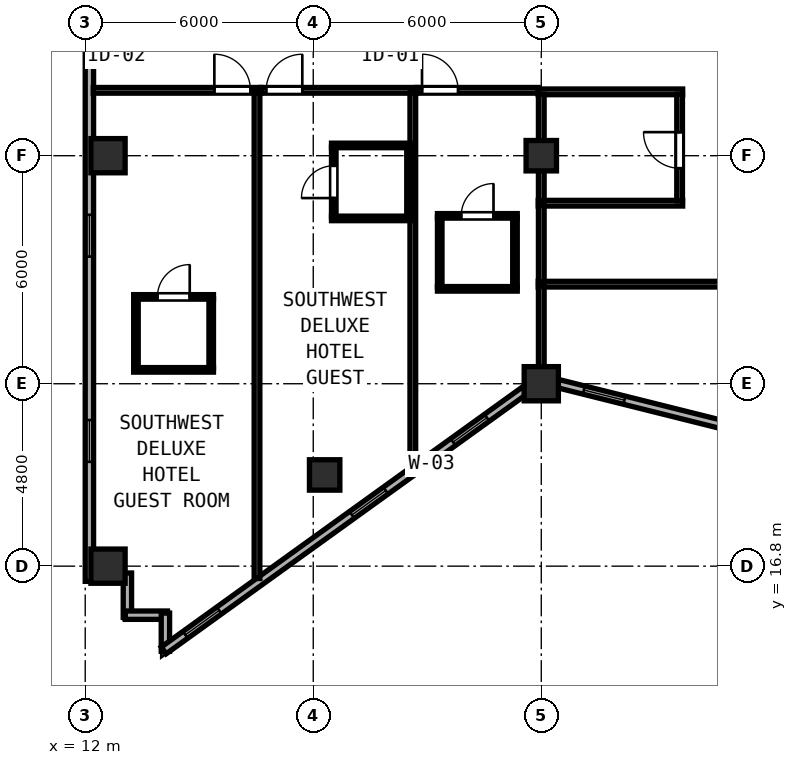
"""IFC4 building model, lengths in metres.
Left out: names, types, materials, properties, quantities, classifications, styles, units other than length and angle.
Written with IfcOpenShell. Run it as: python <this file> out.ifc"""

import sys

from ifc_helpers import new_model, si_unit, direction, frame, frame_2d, origin, origin_2d, place, context, subcontext, project, spatial, rectangle, hollow_rectangle, extrude, element, fill, save


model = new_model("IFC4")
c1 = context("Model", 3, precision=1e-05, world=origin(), true_north=direction((0.0, 1.0)))
c2 = subcontext(c1, "Body", "Model", "MODEL_VIEW")
j1 = project(units=[si_unit("LENGTHUNIT", "METRE"), si_unit("PLANEANGLEUNIT", "RADIAN")], contexts=[c1])
p1 = place(None, origin())
s1 = spatial("IfcSite", under=j1, at=p1, CompositionType="ELEMENT")
p2 = place(p1, origin())
s2 = spatial("IfcBuilding", under=s1, at=p2, CompositionType="ELEMENT")
p3 = place(p2, frame((0.0, 0.0, 199.4)))
s3 = spatial("IfcBuildingStorey", under=s2, at=p3, CompositionType="ELEMENT", Elevation=199.4)
for number, where, z_axis, x_axis in (
    (1, (24.0, 21.6, 0.0), (0.0, 0.0, 1.0), (1.0, 0.0, 0.0)),
    (2, (12.6, 16.8, 0.0), (0.0, 0.0, 1.0), (1.0, 0.0, 0.0)),
    (3, (12.6, 27.6, 0.0), (0.0, 0.0, 1.0), (1.0, 0.0, 0.0)),
):
    element("IfcColumn", number, at=place(p3, frame(where, z_axis=z_axis, x_axis=x_axis)), inside=s3, PredefinedType="COLUMN", context=c2, shape_type="SweptSolid", body=[
        extrude(hollow_rectangle(XDim=0.9, YDim=0.9, WallThickness=0.034, at=origin_2d()), origin(), (0.0, 0.0, 1.0), 3.8),
    ])
for number, where, z_axis, x_axis in (
    (4, (24.0, 27.6, 0.0), (0.0, 0.0, 1.0), (1.0, 0.0, 0.0)),
    (5, (18.3, 19.2, 0.0), (0.0, 0.0, 1.0), (1.0, 0.0, 0.0)),
):
    element("IfcColumn", number, at=place(p3, frame(where, z_axis=z_axis, x_axis=x_axis)), inside=s3, PredefinedType="COLUMN", context=c2, shape_type="SweptSolid", body=[
        extrude(hollow_rectangle(XDim=0.8, YDim=0.8, WallThickness=0.03, at=origin_2d()), origin(), (0.0, 0.0, 1.0), 3.8),
    ])
p4 = place(p3, frame((12.11, 37.545, 0.0), z_axis=(0.0, 0.0, 1.0), x_axis=(0.0, -1.0, 0.0)))
e6 = element("IfcWall", 6, at=p4, inside=s3, PredefinedType="SOLIDWALL", context=c2, shape_type="SweptSolid", body=[
    extrude(rectangle(XDim=21.145, YDim=0.22, at=frame_2d((10.573, 0.0))), origin(), (0.0, 0.0, 1.0), 3.62),
])
p5 = place(p4, frame((0.7, 0.0, 0.85)))
e7 = element("IfcOpeningElement", 7, at=p5, cuts=e6, PredefinedType="OPENING", context=c2, shape_type="SweptSolid", body=[
    extrude(rectangle(XDim=1.1, YDim=1.75, at=frame_2d((0.55, 0.875))), frame((0.0, 0.12, 0.0), z_axis=(0.0, -1.0, 0.0), x_axis=(1.0, 0.0, 0.0)), (0.0, 0.0, 1.0), 0.24),
])
p6 = place(p4, frame((6.45, 0.0, 0.85)))
e8 = element("IfcOpeningElement", 8, at=p6, cuts=e6, PredefinedType="OPENING", context=c2, shape_type="SweptSolid", body=[
    extrude(rectangle(XDim=1.1, YDim=1.75, at=frame_2d((0.55, 0.875))), frame((0.0, 0.12, 0.0), z_axis=(0.0, -1.0, 0.0), x_axis=(1.0, 0.0, 0.0)), (0.0, 0.0, 1.0), 0.24),
])
p7 = place(p4, frame((11.5, 0.0, 0.85)))
e9 = element("IfcOpeningElement", 9, at=p7, cuts=e6, PredefinedType="OPENING", context=c2, shape_type="SweptSolid", body=[
    extrude(rectangle(XDim=1.1, YDim=1.75, at=frame_2d((0.55, 0.875))), frame((0.0, 0.12, 0.0), z_axis=(0.0, -1.0, 0.0), x_axis=(1.0, 0.0, 0.0)), (0.0, 0.0, 1.0), 0.24),
])
p8 = place(p4, frame((16.9, 0.0, 0.85)))
e10 = element("IfcOpeningElement", 10, at=p8, cuts=e6, PredefinedType="OPENING", context=c2, shape_type="SweptSolid", body=[
    extrude(rectangle(XDim=1.1, YDim=1.75, at=frame_2d((0.55, 0.875))), frame((0.0, 0.12, 0.0), z_axis=(0.0, -1.0, 0.0), x_axis=(1.0, 0.0, 0.0)), (0.0, 0.0, 1.0), 0.24),
])
p9 = place(p3, frame((13.11, 16.62, 0.0), z_axis=(0.0, 0.0, 1.0), x_axis=(0.0, -1.0, 0.0)))
e11 = element("IfcWall", 11, at=p9, inside=s3, PredefinedType="SOLIDWALL", context=c2, shape_type="SweptSolid", body=[
    extrude(rectangle(XDim=1.165, YDim=0.22, at=frame_2d((0.583, 0.0))), origin(), (0.0, 0.0, 1.0), 3.62),
])
p10 = place(p3, frame((13.055, 15.51, 0.0), z_axis=(0.0, 0.0, 1.0), x_axis=(1.0, 0.0, 0.0)))
e12 = element("IfcWall", 12, at=p10, inside=s3, PredefinedType="SOLIDWALL", context=c2, shape_type="SweptSolid", body=[
    extrude(rectangle(XDim=1.11, YDim=0.22, at=frame_2d((0.555, 0.0))), origin(), (0.0, 0.0, 1.0), 3.62),
])
p11 = place(p3, frame((14.11, 15.565, 0.0), z_axis=(0.0, 0.0, 1.0), x_axis=(0.0, -1.0, 0.0)))
e13 = element("IfcWall", 13, at=p11, inside=s3, PredefinedType="SOLIDWALL", context=c2, shape_type="SweptSolid", body=[
    extrude(rectangle(XDim=1.005, YDim=0.22, at=frame_2d((0.502, 0.0))), origin(), (0.0, 0.0, 1.0), 3.62),
])
p12 = place(p3, frame((14.065, 14.583, 0.0), z_axis=(0.0, 0.0, 1.0), x_axis=(0.811534737332, 0.58430417601, 0.0)))
e14 = element("IfcWall", 14, at=p12, inside=s3, PredefinedType="SOLIDWALL", context=c2, shape_type="SweptSolid", body=[
    extrude(rectangle(XDim=11.697, YDim=0.22, at=frame_2d((5.849, 0.0))), origin(), (0.0, 0.0, 1.0), 3.215),
])
p13 = place(p12, frame((0.7, 0.0, 0.85)))
e15 = element("IfcOpeningElement", 15, at=p13, cuts=e14, PredefinedType="OPENING", context=c2, shape_type="SweptSolid", body=[
    extrude(rectangle(XDim=1.1, YDim=1.75, at=frame_2d((0.55, 0.875))), frame((0.0, 0.12, 0.0), z_axis=(0.0, -1.0, 0.0), x_axis=(1.0, 0.0, 0.0)), (0.0, 0.0, 1.0), 0.24),
])
p14 = place(p12, frame((6.1, 0.0, 0.85)))
e16 = element("IfcOpeningElement", 16, at=p14, cuts=e14, PredefinedType="OPENING", context=c2, shape_type="SweptSolid", body=[
    extrude(rectangle(XDim=1.1, YDim=1.75, at=frame_2d((0.55, 0.875))), frame((0.0, 0.12, 0.0), z_axis=(0.0, -1.0, 0.0), x_axis=(1.0, 0.0, 0.0)), (0.0, 0.0, 1.0), 0.24),
])
p15 = place(p12, frame((9.38, 0.0, 0.85)))
e17 = element("IfcOpeningElement", 17, at=p15, cuts=e14, PredefinedType="OPENING", context=c2, shape_type="SweptSolid", body=[
    extrude(rectangle(XDim=1.1, YDim=1.75, at=frame_2d((0.55, 0.875))), frame((0.0, 0.12, 0.0), z_axis=(0.0, -1.0, 0.0), x_axis=(1.0, 0.0, 0.0)), (0.0, 0.0, 1.0), 0.24),
])
p16 = place(p3, frame((24.442, 21.603, 0.0), z_axis=(0.0, 0.0, 1.0), x_axis=(0.970145648609, -0.242523030833, 0.0)))
e18 = element("IfcWall", 18, at=p16, inside=s3, PredefinedType="SOLIDWALL", context=c2, shape_type="SweptSolid", body=[
    extrude(rectangle(XDim=4.561, YDim=0.22, at=frame_2d((2.281, 0.0))), origin(), (0.0, 0.0, 1.0), 3.215),
])
p17 = place(p16, frame((0.7, 0.0, 0.85)))
e19 = element("IfcOpeningElement", 19, at=p17, cuts=e18, PredefinedType="OPENING", context=c2, shape_type="SweptSolid", body=[
    extrude(rectangle(XDim=1.1, YDim=1.75, at=frame_2d((0.55, 0.875))), frame((0.0, 0.12, 0.0), z_axis=(0.0, -1.0, 0.0), x_axis=(1.0, 0.0, 0.0)), (0.0, 0.0, 1.0), 0.24),
])
for number, where, z_axis, x_axis in (
    (20, (23.92, 29.28, 0.0), (0.0, 0.0, 1.0), (1.0, 0.0, 0.0)),
    (21, (23.92, 26.35, 0.0), (0.0, 0.0, 1.0), (1.0, 0.0, 0.0)),
):
    element("IfcWall", number, at=place(p3, frame(where, z_axis=z_axis, x_axis=x_axis)), inside=s3, PredefinedType="PARTITIONING", context=c2, shape_type="SweptSolid", body=[
        extrude(rectangle(XDim=3.8, YDim=0.15, at=frame_2d((1.9, 0.0))), origin(), (0.0, 0.0, 1.0), 3.62),
    ])
p18 = place(p3, frame((24.0, 26.41, 0.0), z_axis=(0.0, 0.0, 1.0), x_axis=(0.0, 1.0, 0.0)))
e22 = element("IfcWall", 22, at=p18, inside=s3, PredefinedType="PARTITIONING", context=c2, shape_type="SweptSolid", body=[
    extrude(rectangle(XDim=2.81, YDim=0.15, at=frame_2d((1.405, 0.0))), origin(), (0.0, 0.0, 1.0), 3.215),
])
p19 = place(p3, frame((27.64, 26.41, 0.0), z_axis=(0.0, 0.0, 1.0), x_axis=(0.0, 1.0, 0.0)))
e23 = element("IfcWall", 23, at=p19, inside=s3, PredefinedType="PARTITIONING", context=c2, shape_type="SweptSolid", body=[
    extrude(rectangle(XDim=2.81, YDim=0.15, at=frame_2d((1.405, 0.0))), origin(), (0.0, 0.0, 1.0), 3.62),
])
p20 = place(p19, frame((1.81, 0.0, 0.0), z_axis=(0.0, 0.0, 1.0), x_axis=(-1.0, 0.0, 0.0)))
e24 = element("IfcOpeningElement", 24, at=p20, cuts=e23, PredefinedType="OPENING", context=c2, shape_type="SweptSolid", body=[
    extrude(rectangle(XDim=0.95, YDim=2.12, at=frame_2d((0.475, 1.06))), frame((0.0, 0.085, 0.0), z_axis=(0.0, -1.0, 0.0), x_axis=(1.0, 0.0, 0.0)), (0.0, 0.0, 1.0), 0.17),
])
p21 = place(p3, frame((23.92, 24.22, 0.0), z_axis=(0.0, 0.0, 1.0), x_axis=(1.0, 0.0, 0.0)))
e25 = element("IfcWall", 25, at=p21, inside=s3, PredefinedType="PARTITIONING", context=c2, shape_type="SweptSolid", body=[
    extrude(rectangle(XDim=14.56, YDim=0.15, at=frame_2d((7.28, 0.0))), origin(), (0.0, 0.0, 1.0), 3.62),
])
p22 = place(p21, frame((9.445, 0.0, 0.0), z_axis=(0.0, 0.0, 1.0), x_axis=(-1.0, 0.0, 0.0)))
e26 = element("IfcOpeningElement", 26, at=p22, cuts=e25, PredefinedType="OPENING", context=c2, shape_type="SweptSolid", body=[
    extrude(rectangle(XDim=0.95, YDim=2.12, at=frame_2d((0.475, 1.06))), frame((0.0, 0.085, 0.0), z_axis=(0.0, -1.0, 0.0), x_axis=(1.0, 0.0, 0.0)), (0.0, 0.0, 1.0), 0.17),
])
p23 = place(p3, frame((24.0, 21.819, 0.0), z_axis=(0.0, 0.0, 1.0), x_axis=(0.0, 1.0, 0.0)))
e27 = element("IfcWall", 27, at=p23, inside=s3, PredefinedType="PARTITIONING", context=c2, shape_type="SweptSolid", body=[
    extrude(rectangle(XDim=2.341, YDim=0.15, at=frame_2d((1.171, 0.0))), origin(), (0.0, 0.0, 1.0), 3.215),
])
p24 = place(p3, frame((12.212, 29.32, 0.0), z_axis=(0.0, 0.0, 1.0), x_axis=(1.0, 0.0, 0.0)))
e28 = element("IfcWall", 28, at=p24, inside=s3, PredefinedType="PARTITIONING", context=c2, shape_type="SweptSolid", body=[
    extrude(rectangle(XDim=4.408, YDim=0.15, at=frame_2d((2.204, 0.0))), origin(), (0.0, 0.0, 1.0), 3.62),
])
p25 = place(p24, frame((4.136, 0.0, 0.0), z_axis=(0.0, 0.0, 1.0), x_axis=(-1.0, 0.0, 0.0)))
e29 = element("IfcOpeningElement", 29, at=p25, cuts=e28, PredefinedType="OPENING", context=c2, shape_type="SweptSolid", body=[
    extrude(rectangle(XDim=0.95, YDim=2.15, at=frame_2d((0.475, 1.075))), frame((0.0, 0.085, 0.0), z_axis=(0.0, -1.0, 0.0), x_axis=(1.0, 0.0, 0.0)), (0.0, 0.0, 1.0), 0.17),
])
p26 = place(p3, frame((16.52, 16.476, 0.0), z_axis=(0.0, 0.0, 1.0), x_axis=(0.0, 1.0, 0.0)))
e30 = element("IfcWall", 30, at=p26, inside=s3, PredefinedType="PARTITIONING", context=c2, shape_type="SweptSolid", body=[
    extrude(rectangle(XDim=12.784, YDim=0.15, at=frame_2d((6.392, 0.0))), origin(), (0.0, 0.0, 1.0), 3.62),
])
p27 = place(p3, frame((13.275, 23.885, 0.0), z_axis=(0.0, 0.0, 1.0), x_axis=(1.0, 0.0, 0.0)))
e31 = element("IfcWall", 31, at=p27, inside=s3, PredefinedType="PARTITIONING", context=c2, shape_type="SweptSolid", body=[
    extrude(rectangle(XDim=2.1, YDim=0.12, at=frame_2d((1.05, 0.0))), origin(), (0.0, 0.0, 1.0), 3.62),
])
p28 = place(p27, frame((1.475, 0.0, 0.0), z_axis=(0.0, 0.0, 1.0), x_axis=(-1.0, 0.0, 0.0)))
e32 = element("IfcOpeningElement", 32, at=p28, cuts=e31, PredefinedType="OPENING", context=c2, shape_type="SweptSolid", body=[
    extrude(rectangle(XDim=0.85, YDim=2.1, at=frame_2d((0.425, 1.05))), frame((0.0, 0.07, 0.0), z_axis=(0.0, -1.0, 0.0), x_axis=(1.0, 0.0, 0.0)), (0.0, 0.0, 1.0), 0.14),
])
p29 = place(p3, frame((13.275, 21.965, 0.0), z_axis=(0.0, 0.0, 1.0), x_axis=(1.0, 0.0, 0.0)))
e33 = element("IfcWall", 33, at=p29, inside=s3, PredefinedType="PARTITIONING", context=c2, shape_type="SweptSolid", body=[
    extrude(rectangle(XDim=2.1, YDim=0.12, at=frame_2d((1.05, 0.0))), origin(), (0.0, 0.0, 1.0), 3.62),
])
for number, where, z_axis, x_axis in (
    (34, (13.335, 22.01, 0.0), (0.0, 0.0, 1.0), (0.0, 1.0, 0.0)),
    (35, (15.315, 22.01, 0.0), (0.0, 0.0, 1.0), (0.0, 1.0, 0.0)),
):
    element("IfcWall", number, at=place(p3, frame(where, z_axis=z_axis, x_axis=x_axis)), inside=s3, PredefinedType="PARTITIONING", context=c2, shape_type="SweptSolid", body=[
        extrude(rectangle(XDim=1.83, YDim=0.12, at=frame_2d((0.915, 0.0))), origin(), (0.0, 0.0, 1.0), 3.62),
    ])
p30 = place(p3, frame((16.622, 29.32, 0.0), z_axis=(0.0, 0.0, 1.0), x_axis=(1.0, 0.0, 0.0)))
e36 = element("IfcWall", 36, at=p30, inside=s3, PredefinedType="PARTITIONING", context=c2, shape_type="SweptSolid", body=[
    extrude(rectangle(XDim=4.098, YDim=0.15, at=frame_2d((2.049, 0.0))), origin(), (0.0, 0.0, 1.0), 3.62),
])
p31 = place(p30, frame((1.09, 0.0, 0.0), z_axis=(0.0, 0.0, 1.0), x_axis=(-1.0, 0.0, 0.0)))
e37 = element("IfcOpeningElement", 37, at=p31, cuts=e36, PredefinedType="OPENING", context=c2, shape_type="SweptSolid", body=[
    extrude(rectangle(XDim=0.95, YDim=2.15, at=frame_2d((0.475, 1.075))), frame((0.0, 0.085, 0.0), z_axis=(0.0, -1.0, 0.0), x_axis=(1.0, 0.0, 0.0)), (0.0, 0.0, 1.0), 0.17),
])
p32 = place(p3, frame((20.62, 19.427, 0.0), z_axis=(0.0, 0.0, 1.0), x_axis=(0.0, 1.0, 0.0)))
e38 = element("IfcWall", 38, at=p32, inside=s3, PredefinedType="PARTITIONING", context=c2, shape_type="SweptSolid", body=[
    extrude(rectangle(XDim=9.833, YDim=0.15, at=frame_2d((4.916, 0.0))), origin(), (0.0, 0.0, 1.0), 3.62),
])
for number, where, z_axis, x_axis in (
    (39, (18.48, 27.87, 0.0), (0.0, 0.0, 1.0), (1.0, 0.0, 0.0)),
    (40, (18.48, 25.95, 0.0), (0.0, 0.0, 1.0), (1.0, 0.0, 0.0)),
):
    element("IfcWall", number, at=place(p3, frame(where, z_axis=z_axis, x_axis=x_axis)), inside=s3, PredefinedType="PARTITIONING", context=c2, shape_type="SweptSolid", body=[
        extrude(rectangle(XDim=2.08, YDim=0.12, at=frame_2d((1.04, 0.0))), origin(), (0.0, 0.0, 1.0), 3.62),
    ])
p33 = place(p3, frame((18.54, 25.995, 0.0), z_axis=(0.0, 0.0, 1.0), x_axis=(0.0, 1.0, 0.0)))
e41 = element("IfcWall", 41, at=p33, inside=s3, PredefinedType="PARTITIONING", context=c2, shape_type="SweptSolid", body=[
    extrude(rectangle(XDim=1.83, YDim=0.12, at=frame_2d((0.915, 0.0))), origin(), (0.0, 0.0, 1.0), 3.62),
])
p34 = place(p33, frame((1.34, 0.0, 0.0), z_axis=(0.0, 0.0, 1.0), x_axis=(-1.0, 0.0, 0.0)))
e42 = element("IfcOpeningElement", 42, at=p34, cuts=e41, PredefinedType="OPENING", context=c2, shape_type="SweptSolid", body=[
    extrude(rectangle(XDim=0.85, YDim=2.1, at=frame_2d((0.425, 1.05))), frame((0.0, 0.07, 0.0), z_axis=(0.0, -1.0, 0.0), x_axis=(1.0, 0.0, 0.0)), (0.0, 0.0, 1.0), 0.14),
])
p35 = place(p3, frame((20.52, 25.995, 0.0), z_axis=(0.0, 0.0, 1.0), x_axis=(0.0, 1.0, 0.0)))
e43 = element("IfcWall", 43, at=p35, inside=s3, PredefinedType="PARTITIONING", context=c2, shape_type="SweptSolid", body=[
    extrude(rectangle(XDim=1.83, YDim=0.12, at=frame_2d((0.915, 0.0))), origin(), (0.0, 0.0, 1.0), 3.62),
])
p36 = place(p3, frame((20.722, 29.32, 0.0), z_axis=(0.0, 0.0, 1.0), x_axis=(1.0, 0.0, 0.0)))
e44 = element("IfcWall", 44, at=p36, inside=s3, PredefinedType="PARTITIONING", context=c2, shape_type="SweptSolid", body=[
    extrude(rectangle(XDim=3.196, YDim=0.15, at=frame_2d((1.598, 0.0))), origin(), (0.0, 0.0, 1.0), 3.62),
])
p37 = place(p36, frame((1.09, 0.0, 0.0), z_axis=(0.0, 0.0, 1.0), x_axis=(-1.0, 0.0, 0.0)))
e45 = element("IfcOpeningElement", 45, at=p37, cuts=e44, PredefinedType="OPENING", context=c2, shape_type="SweptSolid", body=[
    extrude(rectangle(XDim=0.95, YDim=2.15, at=frame_2d((0.475, 1.075))), frame((0.0, 0.085, 0.0), z_axis=(0.0, -1.0, 0.0), x_axis=(1.0, 0.0, 0.0)), (0.0, 0.0, 1.0), 0.17),
])
p38 = place(p3, frame((24.0, 24.28, 0.0), z_axis=(0.0, 0.0, 1.0), x_axis=(0.0, 1.0, 0.0)))
e46 = element("IfcWall", 46, at=p38, inside=s3, PredefinedType="PARTITIONING", context=c2, shape_type="SweptSolid", body=[
    extrude(rectangle(XDim=2.01, YDim=0.15, at=frame_2d((1.005, 0.0))), origin(), (0.0, 0.0, 1.0), 3.215),
])
p39 = place(p3, frame((21.268, 26.017, 0.0), z_axis=(0.0, 0.0, 1.0), x_axis=(1.0, 0.0, 0.0)))
e47 = element("IfcWall", 47, at=p39, inside=s3, PredefinedType="PARTITIONING", context=c2, shape_type="SweptSolid", body=[
    extrude(rectangle(XDim=2.1, YDim=0.12, at=frame_2d((1.05, 0.0))), origin(), (0.0, 0.0, 1.0), 3.62),
])
p40 = place(p39, frame((1.475, 0.0, 0.0), z_axis=(0.0, 0.0, 1.0), x_axis=(-1.0, 0.0, 0.0)))
e48 = element("IfcOpeningElement", 48, at=p40, cuts=e47, PredefinedType="OPENING", context=c2, shape_type="SweptSolid", body=[
    extrude(rectangle(XDim=0.85, YDim=2.1, at=frame_2d((0.425, 1.05))), frame((0.0, 0.07, 0.0), z_axis=(0.0, -1.0, 0.0), x_axis=(1.0, 0.0, 0.0)), (0.0, 0.0, 1.0), 0.14),
])
p41 = place(p3, frame((21.268, 24.097, 0.0), z_axis=(0.0, 0.0, 1.0), x_axis=(1.0, 0.0, 0.0)))
e49 = element("IfcWall", 49, at=p41, inside=s3, PredefinedType="PARTITIONING", context=c2, shape_type="SweptSolid", body=[
    extrude(rectangle(XDim=2.1, YDim=0.12, at=frame_2d((1.05, 0.0))), origin(), (0.0, 0.0, 1.0), 3.62),
])
for number, where, z_axis, x_axis in (
    (50, (21.328, 24.142, 0.0), (0.0, 0.0, 1.0), (0.0, 1.0, 0.0)),
    (51, (23.308, 24.142, 0.0), (0.0, 0.0, 1.0), (0.0, 1.0, 0.0)),
):
    element("IfcWall", number, at=place(p3, frame(where, z_axis=z_axis, x_axis=x_axis)), inside=s3, PredefinedType="PARTITIONING", context=c2, shape_type="SweptSolid", body=[
        extrude(rectangle(XDim=1.83, YDim=0.12, at=frame_2d((0.915, 0.0))), origin(), (0.0, 0.0, 1.0), 3.62),
    ])
p42 = place(p6, origin())
e52 = element("IfcWindow", 52, at=p42, inside=s3, PartitioningType="SINGLE_PANEL", PredefinedType="WINDOW", context=c2, shape_type="SweptSolid", body=[
    extrude(rectangle(XDim=1.1, YDim=1.75, at=frame_2d((0.55, 0.875))), frame((0.0, 0.03, 0.0), z_axis=(0.0, -1.0, 0.0), x_axis=(1.0, 0.0, 0.0)), (0.0, 0.0, 1.0), 0.06),
])
fill(e8, e52)
p43 = place(p7, origin())
e53 = element("IfcWindow", 53, at=p43, inside=s3, PartitioningType="SINGLE_PANEL", PredefinedType="WINDOW", context=c2, shape_type="SweptSolid", body=[
    extrude(rectangle(XDim=1.1, YDim=1.75, at=frame_2d((0.55, 0.875))), frame((0.0, 0.03, 0.0), z_axis=(0.0, -1.0, 0.0), x_axis=(1.0, 0.0, 0.0)), (0.0, 0.0, 1.0), 0.06),
])
fill(e9, e53)
p44 = place(p8, origin())
e54 = element("IfcWindow", 54, at=p44, inside=s3, PartitioningType="SINGLE_PANEL", PredefinedType="WINDOW", context=c2, shape_type="SweptSolid", body=[
    extrude(rectangle(XDim=1.1, YDim=1.75, at=frame_2d((0.55, 0.875))), frame((0.0, 0.03, 0.0), z_axis=(0.0, -1.0, 0.0), x_axis=(1.0, 0.0, 0.0)), (0.0, 0.0, 1.0), 0.06),
])
fill(e10, e54)
p45 = place(p13, origin())
e55 = element("IfcWindow", 55, at=p45, inside=s3, PartitioningType="SINGLE_PANEL", PredefinedType="WINDOW", context=c2, shape_type="SweptSolid", body=[
    extrude(rectangle(XDim=1.1, YDim=1.75, at=frame_2d((0.55, 0.875))), frame((0.0, 0.03, 0.0), z_axis=(0.0, -1.0, 0.0), x_axis=(1.0, 0.0, 0.0)), (0.0, 0.0, 1.0), 0.06),
])
fill(e15, e55)
p46 = place(p14, origin())
e56 = element("IfcWindow", 56, at=p46, inside=s3, PartitioningType="SINGLE_PANEL", PredefinedType="WINDOW", context=c2, shape_type="SweptSolid", body=[
    extrude(rectangle(XDim=1.1, YDim=1.75, at=frame_2d((0.55, 0.875))), frame((0.0, 0.03, 0.0), z_axis=(0.0, -1.0, 0.0), x_axis=(1.0, 0.0, 0.0)), (0.0, 0.0, 1.0), 0.06),
])
fill(e16, e56)
p47 = place(p17, origin())
e57 = element("IfcWindow", 57, at=p47, inside=s3, PartitioningType="SINGLE_PANEL", PredefinedType="WINDOW", context=c2, shape_type="SweptSolid", body=[
    extrude(rectangle(XDim=1.1, YDim=1.75, at=frame_2d((0.55, 0.875))), frame((0.0, 0.03, 0.0), z_axis=(0.0, -1.0, 0.0), x_axis=(1.0, 0.0, 0.0)), (0.0, 0.0, 1.0), 0.06),
])
fill(e19, e57)
p48 = place(p20, origin())
e58 = element("IfcDoor", 58, at=p48, inside=s3, OperationType="SINGLE_SWING_LEFT", PredefinedType="DOOR", context=c2, shape_type="SweptSolid", body=[
    extrude(rectangle(XDim=0.95, YDim=2.12, at=frame_2d((0.475, 1.06))), frame((0.0, 0.025, 0.0), z_axis=(0.0, -1.0, 0.0), x_axis=(1.0, 0.0, 0.0)), (0.0, 0.0, 1.0), 0.05),
])
fill(e24, e58)
p49 = place(p25, origin())
e59 = element("IfcDoor", 59, at=p49, inside=s3, OperationType="SINGLE_SWING_RIGHT", PredefinedType="DOOR", context=c2, shape_type="SweptSolid", body=[
    extrude(rectangle(XDim=0.95, YDim=2.15, at=frame_2d((0.475, 1.075))), frame((0.0, 0.025, 0.0), z_axis=(0.0, -1.0, 0.0), x_axis=(1.0, 0.0, 0.0)), (0.0, 0.0, 1.0), 0.05),
])
fill(e29, e59)
p50 = place(p28, origin())
e60 = element("IfcDoor", 60, at=p50, inside=s3, OperationType="SINGLE_SWING_LEFT", PredefinedType="DOOR", context=c2, shape_type="SweptSolid", body=[
    extrude(rectangle(XDim=0.85, YDim=2.1, at=frame_2d((0.425, 1.05))), frame((0.0, 0.025, 0.0), z_axis=(0.0, -1.0, 0.0), x_axis=(1.0, 0.0, 0.0)), (0.0, 0.0, 1.0), 0.05),
])
fill(e32, e60)
p51 = place(p31, origin())
e61 = element("IfcDoor", 61, at=p51, inside=s3, OperationType="SINGLE_SWING_LEFT", PredefinedType="DOOR", context=c2, shape_type="SweptSolid", body=[
    extrude(rectangle(XDim=0.95, YDim=2.15, at=frame_2d((0.475, 1.075))), frame((0.0, 0.025, 0.0), z_axis=(0.0, -1.0, 0.0), x_axis=(1.0, 0.0, 0.0)), (0.0, 0.0, 1.0), 0.05),
])
fill(e37, e61)
p52 = place(p34, origin())
e62 = element("IfcDoor", 62, at=p52, inside=s3, OperationType="SINGLE_SWING_RIGHT", PredefinedType="DOOR", context=c2, shape_type="SweptSolid", body=[
    extrude(rectangle(XDim=0.85, YDim=2.1, at=frame_2d((0.425, 1.05))), frame((0.0, 0.025, 0.0), z_axis=(0.0, -1.0, 0.0), x_axis=(1.0, 0.0, 0.0)), (0.0, 0.0, 1.0), 0.05),
])
fill(e42, e62)
p53 = place(p37, origin())
e63 = element("IfcDoor", 63, at=p53, inside=s3, OperationType="SINGLE_SWING_RIGHT", PredefinedType="DOOR", context=c2, shape_type="SweptSolid", body=[
    extrude(rectangle(XDim=0.95, YDim=2.15, at=frame_2d((0.475, 1.075))), frame((0.0, 0.025, 0.0), z_axis=(0.0, -1.0, 0.0), x_axis=(1.0, 0.0, 0.0)), (0.0, 0.0, 1.0), 0.05),
])
fill(e45, e63)
p54 = place(p40, origin())
e64 = element("IfcDoor", 64, at=p54, inside=s3, OperationType="SINGLE_SWING_LEFT", PredefinedType="DOOR", context=c2, shape_type="SweptSolid", body=[
    extrude(rectangle(XDim=0.85, YDim=2.1, at=frame_2d((0.425, 1.05))), frame((0.0, 0.025, 0.0), z_axis=(0.0, -1.0, 0.0), x_axis=(1.0, 0.0, 0.0)), (0.0, 0.0, 1.0), 0.05),
])
fill(e48, e64)
p55 = place(p15, origin())
e65 = element("IfcWindow", 65, at=p55, inside=s3, PartitioningType="SINGLE_PANEL", PredefinedType="WINDOW", context=c2, shape_type="SweptSolid", body=[
    extrude(rectangle(XDim=1.1, YDim=1.75, at=frame_2d((0.55, 0.875))), frame((0.0, 0.03, 0.0), z_axis=(0.0, -1.0, 0.0), x_axis=(1.0, 0.0, 0.0)), (0.0, 0.0, 1.0), 0.06),
])
fill(e17, e65)
save(model, sys.argv[1])
